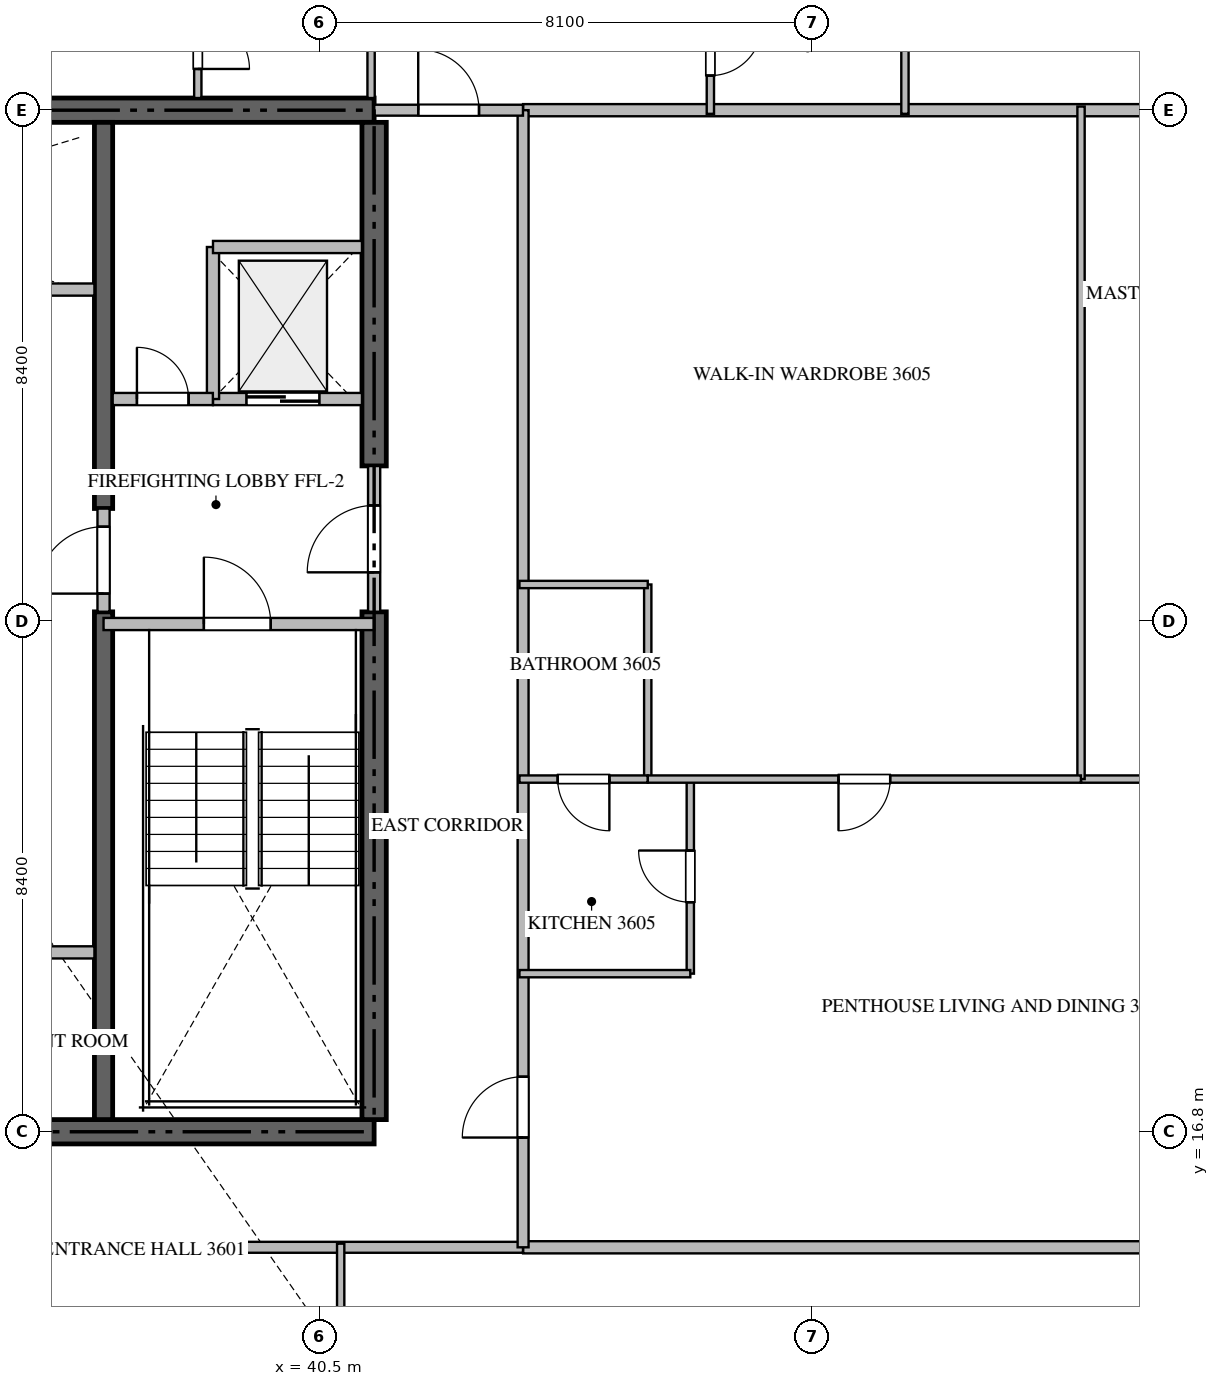
"""IFC4 building model, lengths in metres.
Left out: names, types, materials, properties, quantities, classifications, styles, units other than length and angle.
Written with IfcOpenShell. Run it as: python <this file> out.ifc"""

import sys

from ifc_helpers import new_model, si_unit, direction, frame, frame_2d, origin, place, context, subcontext, project, spatial, rectangle, extrude, source, transform, mapped, element, fill, save


model = new_model("IFC4")
c1 = context("Model", 3, precision=1e-05, world=origin(), true_north=direction((0.0, 1.0)))
c2 = subcontext(c1, "Body", "Model", "MODEL_VIEW")
j1 = project(units=[si_unit("LENGTHUNIT", "METRE"), si_unit("PLANEANGLEUNIT", "RADIAN")], contexts=[c1])
p1 = place(None, origin())
s1 = spatial("IfcSite", under=j1, at=p1, CompositionType="ELEMENT")
p2 = place(p1, origin())
s2 = spatial("IfcBuilding", under=s1, at=p2, CompositionType="ELEMENT")
p3 = place(p2, frame((0.0, 0.0, 146.4)))
s3 = spatial("IfcBuildingStorey", under=s2, at=p3, CompositionType="ELEMENT", Elevation=146.4)
for number, where, z_axis, x_axis in (
    (1, (23.4, 16.8, -0.26), (0.0, 0.0, 1.0), (1.0, 0.0, 0.0)),
    (2, (41.4, 33.6, -0.26), (0.0, 0.0, 1.0), (-1.0, 0.0, 0.0)),
):
    element("IfcWall", number, at=place(p3, frame(where, z_axis=z_axis, x_axis=x_axis)), inside=s3, PredefinedType="SHEAR", context=c2, shape_type="SweptSolid", body=[
        extrude(rectangle(XDim=18.0, YDim=0.4, at=frame_2d((9.0, 0.0))), origin(), (0.0, 0.0, 1.0), 3.748),
    ])
p4 = place(p3, frame((41.4, 17.0, -0.26), z_axis=(0.0, 0.0, 1.0), x_axis=(0.0, 1.0, 0.0)))
e3 = element("IfcWall", 3, at=p4, inside=s3, PredefinedType="SHEAR", context=c2, shape_type="SweptSolid", body=[
    extrude(rectangle(XDim=8.35, YDim=0.4, at=frame_2d((4.175, 0.0))), origin(), (0.0, 0.0, 1.0), 3.748),
])
p5 = place(p3, frame((41.4, 27.75, -0.26), z_axis=(0.0, 0.0, 1.0), x_axis=(0.0, 1.0, 0.0)))
e4 = element("IfcWall", 4, at=p5, inside=s3, PredefinedType="SHEAR", context=c2, shape_type="SweptSolid", body=[
    extrude(rectangle(XDim=5.65, YDim=0.4, at=frame_2d((2.825, 0.0))), origin(), (0.0, 0.0, 1.0), 3.748),
])
p6 = place(p3, frame((36.95, 17.0, -0.26), z_axis=(0.0, 0.0, 1.0), x_axis=(0.0, 1.0, 0.0)))
e5 = element("IfcWall", 5, at=p6, inside=s3, PredefinedType="SHEAR", context=c2, shape_type="SweptSolid", body=[
    extrude(rectangle(XDim=8.35, YDim=0.3, at=frame_2d((4.175, 0.0))), origin(), (0.0, 0.0, 1.0), 3.748),
])
p7 = place(p3, frame((36.95, 27.05, -0.26), z_axis=(0.0, 0.0, 1.0), x_axis=(0.0, 1.0, 0.0)))
e6 = element("IfcWall", 6, at=p7, inside=s3, PredefinedType="SHEAR", context=c2, shape_type="SweptSolid", body=[
    extrude(rectangle(XDim=6.35, YDim=0.3, at=frame_2d((3.175, 0.0))), origin(), (0.0, 0.0, 1.0), 3.748),
])
p8 = place(p3, frame((36.95, 25.15, 0.0), z_axis=(0.0, 0.0, 1.0), x_axis=(1.0, 0.0, 0.0)))
e7 = element("IfcWall", 7, at=p8, inside=s3, PredefinedType="STANDARD", context=c2, shape_type="SweptSolid", body=[
    extrude(rectangle(XDim=4.45, YDim=0.2, at=frame_2d((2.225, 0.0))), origin(), (0.0, 0.0, 1.0), 3.49),
])
p9 = place(p8, frame((1.65, 0.0, 0.0)))
e8 = element("IfcOpeningElement", 8, at=p9, cuts=e7, PredefinedType="OPENING", context=c2, shape_type="SweptSolid", body=[
    extrude(rectangle(XDim=1.1, YDim=2.15, at=frame_2d((0.55, 1.075))), frame((0.0, 0.11, 0.0), z_axis=(0.0, -1.0, 0.0), x_axis=(1.0, 0.0, 0.0)), (0.0, 0.0, 1.0), 0.22),
])
p10 = place(p3, frame((38.75, 28.85, 0.0), z_axis=(0.0, 0.0, 1.0), x_axis=(1.0, 0.0, 0.0)))
e9 = element("IfcWall", 9, at=p10, inside=s3, PredefinedType="STANDARD", context=c2, shape_type="SweptSolid", body=[
    extrude(rectangle(XDim=2.45, YDim=0.2, at=frame_2d((1.225, 0.0))), origin(), (0.0, 0.0, 1.0), 3.49),
])
p11 = place(p10, frame((0.55, 0.0, 0.0)))
e10 = element("IfcOpeningElement", 10, at=p11, cuts=e9, PredefinedType="OPENING", context=c2, shape_type="SweptSolid", body=[
    extrude(rectangle(XDim=1.2, YDim=2.2, at=frame_2d((0.6, 1.1))), frame((0.0, 0.11, 0.0), z_axis=(0.0, -1.0, 0.0), x_axis=(1.0, 0.0, 0.0)), (0.0, 0.0, 1.0), 0.22),
])
p12 = place(p3, frame((35.0, 30.65, 0.0), z_axis=(0.0, 0.0, 1.0), x_axis=(1.0, 0.0, 0.0)))
e11 = element("IfcWall", 11, at=p12, inside=s3, PredefinedType="STANDARD", context=c2, shape_type="SweptSolid", body=[
    extrude(rectangle(XDim=1.8, YDim=0.2, at=frame_2d((0.9, 0.0))), origin(), (0.0, 0.0, 1.0), 3.49),
])
p13 = place(p3, frame((38.75, 28.85, 0.0), z_axis=(0.0, 0.0, 1.0), x_axis=(0.0, 1.0, 0.0)))
e12 = element("IfcWall", 12, at=p13, inside=s3, PredefinedType="STANDARD", context=c2, shape_type="SweptSolid", body=[
    extrude(rectangle(XDim=2.5, YDim=0.2, at=frame_2d((1.25, 0.0))), origin(), (0.0, 0.0, 1.0), 3.49),
])
p14 = place(p3, frame((38.75, 31.35, 0.0), z_axis=(0.0, 0.0, 1.0), x_axis=(1.0, 0.0, 0.0)))
e13 = element("IfcWall", 13, at=p14, inside=s3, PredefinedType="STANDARD", context=c2, shape_type="SweptSolid", body=[
    extrude(rectangle(XDim=2.45, YDim=0.2, at=frame_2d((1.225, 0.0))), origin(), (0.0, 0.0, 1.0), 3.49),
])
p15 = place(p3, frame((37.1, 28.85, 0.0), z_axis=(0.0, 0.0, 1.0), x_axis=(1.0, 0.0, 0.0)))
e14 = element("IfcWall", 14, at=p15, inside=s3, PredefinedType="STANDARD", context=c2, shape_type="SweptSolid", body=[
    extrude(rectangle(XDim=1.648, YDim=0.2, at=frame_2d((0.824, 0.0))), origin(), (0.0, 0.0, 1.0), 3.49),
])
p16 = place(p15, frame((0.399, 0.0, 0.0)))
e15 = element("IfcOpeningElement", 15, at=p16, cuts=e14, PredefinedType="OPENING", context=c2, shape_type="SweptSolid", body=[
    extrude(rectangle(XDim=0.85, YDim=2.1, at=frame_2d((0.425, 1.05))), frame((0.0, 0.11, 0.0), z_axis=(0.0, -1.0, 0.0), x_axis=(1.0, 0.0, 0.0)), (0.0, 0.0, 1.0), 0.22),
])
p17 = place(p3, frame((41.4, 25.352, 0.0), z_axis=(0.0, 0.0, 1.0), x_axis=(0.0, 1.0, 0.0)))
e16 = element("IfcWall", 16, at=p17, inside=s3, PredefinedType="STANDARD", context=c2, shape_type="SweptSolid", body=[
    extrude(rectangle(XDim=2.396, YDim=0.2, at=frame_2d((1.198, 0.0))), origin(), (0.0, 0.0, 1.0), 3.49),
])
p18 = place(p17, frame((0.648, 0.0, 0.0)))
e17 = element("IfcOpeningElement", 17, at=p18, cuts=e16, PredefinedType="OPENING", context=c2, shape_type="SweptSolid", body=[
    extrude(rectangle(XDim=1.1, YDim=2.15, at=frame_2d((0.55, 1.075))), frame((0.0, 0.11, 0.0), z_axis=(0.0, -1.0, 0.0), x_axis=(1.0, 0.0, 0.0)), (0.0, 0.0, 1.0), 0.22),
])
p19 = place(p3, frame((36.95, 25.352, 0.0), z_axis=(0.0, 0.0, 1.0), x_axis=(0.0, 1.0, 0.0)))
e18 = element("IfcWall", 18, at=p19, inside=s3, PredefinedType="STANDARD", context=c2, shape_type="SweptSolid", body=[
    extrude(rectangle(XDim=1.696, YDim=0.2, at=frame_2d((0.848, 0.0))), origin(), (0.0, 0.0, 1.0), 3.49),
])
p20 = place(p19, frame((0.298, 0.0, 0.0)))
e19 = element("IfcOpeningElement", 19, at=p20, cuts=e18, PredefinedType="OPENING", context=c2, shape_type="SweptSolid", body=[
    extrude(rectangle(XDim=1.1, YDim=2.15, at=frame_2d((0.55, 1.075))), frame((0.0, 0.11, 0.0), z_axis=(0.0, -1.0, 0.0), x_axis=(1.0, 0.0, 0.0)), (0.0, 0.0, 1.0), 0.22),
])
p21 = place(p3, frame((28.0, 19.75, 0.0), z_axis=(0.0, 0.0, 1.0), x_axis=(1.0, 0.0, 0.0)))
e20 = element("IfcWall", 20, at=p21, inside=s3, PredefinedType="STANDARD", context=c2, shape_type="SweptSolid", body=[
    extrude(rectangle(XDim=8.8, YDim=0.2, at=frame_2d((4.4, 0.0))), origin(), (0.0, 0.0, 1.0), 3.49),
])
p22 = place(p21, frame((3.95, 0.0, 0.0)))
e21 = element("IfcOpeningElement", 21, at=p22, cuts=e20, PredefinedType="OPENING", context=c2, shape_type="SweptSolid", body=[
    extrude(rectangle(XDim=0.9, YDim=2.1, at=frame_2d((0.45, 1.05))), frame((0.0, 0.11, 0.0), z_axis=(0.0, -1.0, 0.0), x_axis=(1.0, 0.0, 0.0)), (0.0, 0.0, 1.0), 0.22),
])
for number, where, z_axis, x_axis in (
    (22, (43.85, 14.9, 0.0), (0.0, 0.0, 1.0), (1.0, 0.0, 0.0)),
    (23, (43.85, 33.6, 0.0), (0.0, 0.0, 1.0), (1.0, 0.0, 0.0)),
):
    element("IfcWall", number, at=place(p3, frame(where, z_axis=z_axis, x_axis=x_axis)), inside=s3, PredefinedType="PARTITIONING", context=c2, shape_type="SweptSolid", body=[
        extrude(rectangle(XDim=13.068, YDim=0.2, at=frame_2d((6.534, 0.0))), origin(), (0.0, 0.0, 1.0), 3.49),
    ])
p23 = place(p3, frame((20.952, 14.9, 0.0), z_axis=(0.0, 0.0, 1.0), x_axis=(1.0, 0.0, 0.0)))
e24 = element("IfcWall", 24, at=p23, inside=s3, PredefinedType="PARTITIONING", context=c2, shape_type="SweptSolid", body=[
    extrude(rectangle(XDim=22.896, YDim=0.18, at=frame_2d((11.448, 0.0))), origin(), (0.0, 0.0, 1.0), 3.49),
])
p24 = place(p23, frame((7.51, 0.0, 0.0)))
e25 = element("IfcOpeningElement", 25, at=p24, cuts=e24, PredefinedType="OPENING", context=c2, shape_type="SweptSolid", body=[
    extrude(rectangle(XDim=1.0, YDim=2.15, at=frame_2d((0.5, 1.075))), frame((0.0, 0.1, 0.0), z_axis=(0.0, -1.0, 0.0), x_axis=(1.0, 0.0, 0.0)), (0.0, 0.0, 1.0), 0.2),
])
p25 = place(p3, frame((43.85, 14.9, 0.0), z_axis=(0.0, 0.0, 1.0), x_axis=(0.0, 1.0, 0.0)))
e26 = element("IfcWall", 26, at=p25, inside=s3, PredefinedType="PARTITIONING", context=c2, shape_type="SweptSolid", body=[
    extrude(rectangle(XDim=18.7, YDim=0.18, at=frame_2d((9.35, 0.0))), origin(), (0.0, 0.0, 1.0), 3.49),
])
p26 = place(p25, frame((1.805, 0.0, 0.0)))
e27 = element("IfcOpeningElement", 27, at=p26, cuts=e26, PredefinedType="OPENING", context=c2, shape_type="SweptSolid", body=[
    extrude(rectangle(XDim=1.0, YDim=2.15, at=frame_2d((0.5, 1.075))), frame((0.0, 0.1, 0.0), z_axis=(0.0, -1.0, 0.0), x_axis=(1.0, 0.0, 0.0)), (0.0, 0.0, 1.0), 0.2),
])
p27 = place(p3, frame((41.402, 33.6, 0.0), z_axis=(0.0, 0.0, 1.0), x_axis=(1.0, 0.0, 0.0)))
e28 = element("IfcWall", 28, at=p27, inside=s3, PredefinedType="PARTITIONING", context=c2, shape_type="SweptSolid", body=[
    extrude(rectangle(XDim=2.446, YDim=0.18, at=frame_2d((1.223, 0.0))), origin(), (0.0, 0.0, 1.0), 3.49),
])
p28 = place(p27, frame((0.723, 0.0, 0.0)))
e29 = element("IfcOpeningElement", 29, at=p28, cuts=e28, PredefinedType="OPENING", context=c2, shape_type="SweptSolid", body=[
    extrude(rectangle(XDim=1.0, YDim=2.15, at=frame_2d((0.5, 1.075))), frame((0.0, 0.1, 0.0), z_axis=(0.0, -1.0, 0.0), x_axis=(1.0, 0.0, 0.0)), (0.0, 0.0, 1.0), 0.2),
])
p29 = place(p3, frame((40.85, 12.752, 0.0), z_axis=(0.0, 0.0, 1.0), x_axis=(0.0, 1.0, 0.0)))
e30 = element("IfcWall", 30, at=p29, inside=s3, PredefinedType="PARTITIONING", context=c2, shape_type="SweptSolid", body=[
    extrude(rectangle(XDim=2.208, YDim=0.12, at=frame_2d((1.104, 0.0))), origin(), (0.0, 0.0, 1.0), 3.49),
])
p30 = place(p3, frame((41.35, 36.35, 0.0), z_axis=(0.0, 0.0, 1.0), x_axis=(0.0, -1.0, 0.0)))
e31 = element("IfcWall", 31, at=p30, inside=s3, PredefinedType="PARTITIONING", context=c2, shape_type="SweptSolid", body=[
    extrude(rectangle(XDim=2.55, YDim=0.12, at=frame_2d((1.275, 0.0))), origin(), (0.0, 0.0, 1.0), 3.49),
])
p31 = place(p3, frame((38.5, 35.751, 0.0), z_axis=(0.0, 0.0, 1.0), x_axis=(0.0, -1.0, 0.0)))
e32 = element("IfcWall", 32, at=p31, inside=s3, PredefinedType="PARTITIONING", context=c2, shape_type="SweptSolid", body=[
    extrude(rectangle(XDim=1.951, YDim=0.12, at=frame_2d((0.976, 0.0))), origin(), (0.0, 0.0, 1.0), 3.49),
])
p32 = place(p31, frame((0.623, 0.0, 0.0)))
e33 = element("IfcOpeningElement", 33, at=p32, cuts=e32, PredefinedType="OPENING", context=c2, shape_type="SweptSolid", body=[
    extrude(rectangle(XDim=0.85, YDim=2.1, at=frame_2d((0.425, 1.05))), frame((0.0, 0.07, 0.0), z_axis=(0.0, -1.0, 0.0), x_axis=(1.0, 0.0, 0.0)), (0.0, 0.0, 1.0), 0.14),
])
p33 = place(p3, frame((50.13, 35.65, 0.0), z_axis=(0.0, 0.0, 1.0), x_axis=(0.0, -1.0, 0.0)))
e34 = element("IfcWall", 34, at=p33, inside=s3, PredefinedType="PARTITIONING", context=c2, shape_type="SweptSolid", body=[
    extrude(rectangle(XDim=2.11, YDim=0.12, at=frame_2d((1.055, 0.0))), origin(), (0.0, 0.0, 1.0), 3.49),
])
p34 = place(p3, frame((46.93, 35.648, 0.0), z_axis=(0.0, 0.0, 1.0), x_axis=(0.0, -1.0, 0.0)))
e35 = element("IfcWall", 35, at=p34, inside=s3, PredefinedType="PARTITIONING", context=c2, shape_type="SweptSolid", body=[
    extrude(rectangle(XDim=2.108, YDim=0.12, at=frame_2d((1.054, 0.0))), origin(), (0.0, 0.0, 1.0), 3.49),
])
p35 = place(p34, frame((0.629, 0.0, 0.0)))
e36 = element("IfcOpeningElement", 36, at=p35, cuts=e35, PredefinedType="OPENING", context=c2, shape_type="SweptSolid", body=[
    extrude(rectangle(XDim=0.85, YDim=2.1, at=frame_2d((0.425, 1.05))), frame((0.0, 0.07, 0.0), z_axis=(0.0, -1.0, 0.0), x_axis=(1.0, 0.0, 0.0)), (0.0, 0.0, 1.0), 0.14),
])
p36 = place(p3, frame((46.6, 19.4, 0.0), z_axis=(0.0, 0.0, 1.0), x_axis=(0.0, 1.0, 0.0)))
e37 = element("IfcWall", 37, at=p36, inside=s3, PredefinedType="PARTITIONING", context=c2, shape_type="SweptSolid", body=[
    extrude(rectangle(XDim=3.2, YDim=0.12, at=frame_2d((1.6, 0.0))), origin(), (0.0, 0.0, 1.0), 3.49),
])
p37 = place(p36, frame((1.175, 0.0, 0.0)))
e38 = element("IfcOpeningElement", 38, at=p37, cuts=e37, PredefinedType="OPENING", context=c2, shape_type="SweptSolid", body=[
    extrude(rectangle(XDim=0.85, YDim=2.1, at=frame_2d((0.425, 1.05))), frame((0.0, 0.07, 0.0), z_axis=(0.0, -1.0, 0.0), x_axis=(1.0, 0.0, 0.0)), (0.0, 0.0, 1.0), 0.14),
])
p38 = place(p3, frame((46.6, 19.4, 0.0), z_axis=(0.0, 0.0, 1.0), x_axis=(-1.0, 0.0, 0.0)))
e39 = element("IfcWall", 39, at=p38, inside=s3, PredefinedType="PARTITIONING", context=c2, shape_type="SweptSolid", body=[
    extrude(rectangle(XDim=2.81, YDim=0.12, at=frame_2d((1.405, 0.0))), origin(), (0.0, 0.0, 1.0), 3.49),
])
p39 = place(p3, frame((56.905, 22.6, 0.0), z_axis=(0.0, 0.0, 1.0), x_axis=(-1.0, 0.0, 0.0)))
e40 = element("IfcWall", 40, at=p39, inside=s3, PredefinedType="PARTITIONING", context=c2, shape_type="SweptSolid", body=[
    extrude(rectangle(XDim=3.879, YDim=0.12, at=frame_2d((1.939, 0.0))), origin(), (0.0, 0.0, 1.0), 3.49),
])
p40 = place(p39, frame((1.918, 0.0, 0.0)))
e41 = element("IfcOpeningElement", 41, at=p40, cuts=e40, PredefinedType="OPENING", context=c2, shape_type="SweptSolid", body=[
    extrude(rectangle(XDim=0.9, YDim=2.1, at=frame_2d((0.45, 1.05))), frame((0.0, 0.07, 0.0), z_axis=(0.0, -1.0, 0.0), x_axis=(1.0, 0.0, 0.0)), (0.0, 0.0, 1.0), 0.14),
])
p41 = place(p3, frame((53.026, 22.6, 0.0), z_axis=(0.0, 0.0, 1.0), x_axis=(0.0, 1.0, 0.0)))
e42 = element("IfcWall", 42, at=p41, inside=s3, PredefinedType="PARTITIONING", context=c2, shape_type="SweptSolid", body=[
    extrude(rectangle(XDim=11.06, YDim=0.12, at=frame_2d((5.53, 0.0))), origin(), (0.0, 0.0, 1.0), 3.49),
])
p42 = place(p3, frame((45.9, 22.6, 0.0), z_axis=(0.0, 0.0, 1.0), x_axis=(0.0, 1.0, 0.0)))
e43 = element("IfcWall", 43, at=p42, inside=s3, PredefinedType="PARTITIONING", context=c2, shape_type="SweptSolid", body=[
    extrude(rectangle(XDim=3.2, YDim=0.12, at=frame_2d((1.6, 0.0))), origin(), (0.0, 0.0, 1.0), 3.49),
])
p43 = place(p3, frame((45.9, 25.8, 0.0), z_axis=(0.0, 0.0, 1.0), x_axis=(-1.0, 0.0, 0.0)))
e44 = element("IfcWall", 44, at=p43, inside=s3, PredefinedType="PARTITIONING", context=c2, shape_type="SweptSolid", body=[
    extrude(rectangle(XDim=2.11, YDim=0.12, at=frame_2d((1.055, 0.0))), origin(), (0.0, 0.0, 1.0), 3.49),
])
p44 = place(p3, frame((53.024, 22.6, 0.0), z_axis=(0.0, 0.0, 1.0), x_axis=(-1.0, 0.0, 0.0)))
e45 = element("IfcWall", 45, at=p44, inside=s3, PredefinedType="PARTITIONING", context=c2, shape_type="SweptSolid", body=[
    extrude(rectangle(XDim=7.124, YDim=0.12, at=frame_2d((3.562, 0.0))), origin(), (0.0, 0.0, 1.0), 3.49),
])
p45 = place(p44, frame((3.137, 0.0, 0.0)))
e46 = element("IfcOpeningElement", 46, at=p45, cuts=e45, PredefinedType="OPENING", context=c2, shape_type="SweptSolid", body=[
    extrude(rectangle(XDim=0.85, YDim=2.1, at=frame_2d((0.425, 1.05))), frame((0.0, 0.07, 0.0), z_axis=(0.0, -1.0, 0.0), x_axis=(1.0, 0.0, 0.0)), (0.0, 0.0, 1.0), 0.14),
])
p46 = place(p3, frame((45.898, 22.6, 0.0), z_axis=(0.0, 0.0, 1.0), x_axis=(-1.0, 0.0, 0.0)))
e47 = element("IfcWall", 47, at=p46, inside=s3, PredefinedType="PARTITIONING", context=c2, shape_type="SweptSolid", body=[
    extrude(rectangle(XDim=2.108, YDim=0.12, at=frame_2d((1.054, 0.0))), origin(), (0.0, 0.0, 1.0), 3.49),
])
p47 = place(p46, frame((0.629, 0.0, 0.0)))
e48 = element("IfcOpeningElement", 48, at=p47, cuts=e47, PredefinedType="OPENING", context=c2, shape_type="SweptSolid", body=[
    extrude(rectangle(XDim=0.85, YDim=2.1, at=frame_2d((0.425, 1.05))), frame((0.0, 0.07, 0.0), z_axis=(0.0, -1.0, 0.0), x_axis=(1.0, 0.0, 0.0)), (0.0, 0.0, 1.0), 0.14),
])
m1 = source(origin(), c2, "Body", "SweptSolid", [
    extrude(rectangle(XDim=1.1, YDim=2.15, at=frame_2d((0.55, 1.075))), frame((0.0, 0.025, 0.0), z_axis=(0.0, -1.0, 0.0), x_axis=(1.0, 0.0, 0.0)), (0.0, 0.0, 1.0), 0.05),
])
p48 = place(p9, origin())
e49 = element("IfcDoor", 49, at=p48, inside=s3, OperationType="SINGLE_SWING_LEFT", PredefinedType="DOOR", context=c2, shape_type="MappedRepresentation", body=[
    mapped(m1, transform((0.0, 0.0, 0.0), scale=1.0)),
])
fill(e8, e49)
m2 = source(origin(), c2, "Body", "SweptSolid", [
    extrude(rectangle(XDim=1.2, YDim=2.2, at=frame_2d((0.6, 1.1))), frame((0.0, 0.025, 0.0), z_axis=(0.0, -1.0, 0.0), x_axis=(1.0, 0.0, 0.0)), (0.0, 0.0, 1.0), 0.05),
])
p49 = place(p11, origin())
e50 = element("IfcDoor", 50, at=p49, inside=s3, OperationType="DOUBLE_DOOR_SLIDING", PredefinedType="DOOR", context=c2, shape_type="MappedRepresentation", body=[
    mapped(m2, transform((0.0, 0.0, 0.0), scale=1.0)),
])
fill(e10, e50)
m3 = source(origin(), c2, "Body", "SweptSolid", [
    extrude(rectangle(XDim=0.85, YDim=2.1, at=frame_2d((0.425, 1.05))), frame((0.0, 0.025, 0.0), z_axis=(0.0, -1.0, 0.0), x_axis=(1.0, 0.0, 0.0)), (0.0, 0.0, 1.0), 0.05),
])
p50 = place(p16, origin())
e51 = element("IfcDoor", 51, at=p50, inside=s3, OperationType="SINGLE_SWING_LEFT", PredefinedType="DOOR", context=c2, shape_type="MappedRepresentation", body=[
    mapped(m3, transform((0.0, 0.0, 0.0), scale=1.0)),
])
fill(e15, e51)
p51 = place(p18, origin())
e52 = element("IfcDoor", 52, at=p51, inside=s3, OperationType="SINGLE_SWING_LEFT", PredefinedType="DOOR", context=c2, shape_type="MappedRepresentation", body=[
    mapped(m1, transform((0.0, 0.0, 0.0), scale=1.0)),
])
fill(e17, e52)
p52 = place(p20, origin())
e53 = element("IfcDoor", 53, at=p52, inside=s3, OperationType="SINGLE_SWING_LEFT", PredefinedType="DOOR", context=c2, shape_type="MappedRepresentation", body=[
    mapped(m1, transform((0.0, 0.0, 0.0), scale=1.0)),
])
fill(e19, e53)
m4 = source(origin(), c2, "Body", "SweptSolid", [
    extrude(rectangle(XDim=1.0, YDim=2.15, at=frame_2d((0.5, 1.075))), frame((0.0, 0.025, 0.0), z_axis=(0.0, -1.0, 0.0), x_axis=(1.0, 0.0, 0.0)), (0.0, 0.0, 1.0), 0.05),
])
p53 = place(p26, origin())
e54 = element("IfcDoor", 54, at=p53, inside=s3, OperationType="SINGLE_SWING_LEFT", PredefinedType="DOOR", context=c2, shape_type="MappedRepresentation", body=[
    mapped(m4, transform((0.0, 0.0, 0.0), scale=1.0)),
])
fill(e27, e54)
p54 = place(p28, origin())
e55 = element("IfcDoor", 55, at=p54, inside=s3, OperationType="SINGLE_SWING_LEFT", PredefinedType="DOOR", context=c2, shape_type="MappedRepresentation", body=[
    mapped(m4, transform((0.0, 0.0, 0.0), scale=1.0)),
])
fill(e29, e55)
p55 = place(p32, origin())
e56 = element("IfcDoor", 56, at=p55, inside=s3, OperationType="SINGLE_SWING_RIGHT", PredefinedType="DOOR", context=c2, shape_type="MappedRepresentation", body=[
    mapped(m3, transform((0.0, 0.0, 0.0), scale=1.0)),
])
fill(e33, e56)
p56 = place(p35, origin())
e57 = element("IfcDoor", 57, at=p56, inside=s3, OperationType="SINGLE_SWING_LEFT", PredefinedType="DOOR", context=c2, shape_type="MappedRepresentation", body=[
    mapped(m3, transform((0.0, 0.0, 0.0), scale=1.0)),
])
fill(e36, e57)
p57 = place(p37, origin())
e58 = element("IfcDoor", 58, at=p57, inside=s3, OperationType="SINGLE_SWING_RIGHT", PredefinedType="DOOR", context=c2, shape_type="MappedRepresentation", body=[
    mapped(m3, transform((0.0, 0.0, 0.0), scale=1.0)),
])
fill(e38, e58)
p58 = place(p45, origin())
e59 = element("IfcDoor", 59, at=p58, inside=s3, OperationType="SINGLE_SWING_RIGHT", PredefinedType="DOOR", context=c2, shape_type="MappedRepresentation", body=[
    mapped(m3, transform((0.0, 0.0, 0.0), scale=1.0)),
])
fill(e46, e59)
p59 = place(p47, origin())
e60 = element("IfcDoor", 60, at=p59, inside=s3, OperationType="SINGLE_SWING_LEFT", PredefinedType="DOOR", context=c2, shape_type="MappedRepresentation", body=[
    mapped(m3, transform((0.0, 0.0, 0.0), scale=1.0)),
])
fill(e48, e60)
save(model, sys.argv[1])
